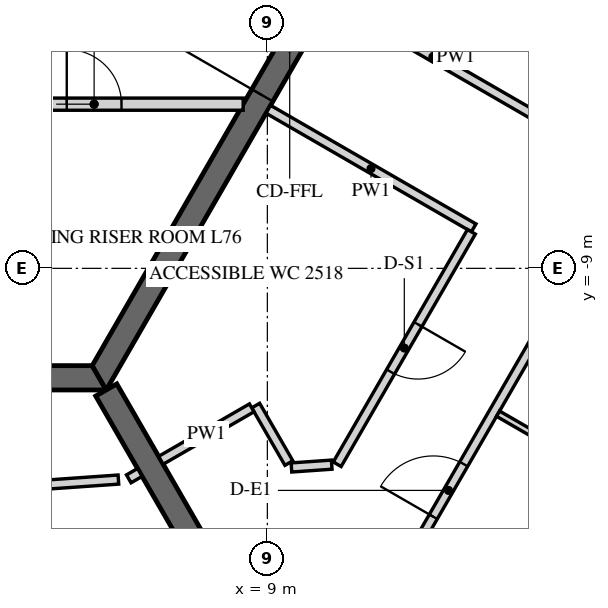
"""IFC4 building model, lengths in metres.
Left out: names, types, materials, properties, quantities, classifications, styles, units other than length and angle.
Written with IfcOpenShell. Run it as: python <this file> out.ifc"""

import sys

from ifc_helpers import new_model, si_unit, direction, frame, frame_2d, origin, place, context, subcontext, project, spatial, polyline, rectangle, outline, extrude, element, fill, save


model = new_model("IFC4")
c1 = context("Model", 3, precision=1e-05, world=origin(), true_north=direction((0.0, 1.0)))
c2 = subcontext(c1, "Body", "Model", "MODEL_VIEW")
j1 = project(units=[si_unit("LENGTHUNIT", "METRE"), si_unit("PLANEANGLEUNIT", "RADIAN")], contexts=[c1])
p1 = place(None, origin())
s1 = spatial("IfcSite", under=j1, at=p1, CompositionType="ELEMENT")
p2 = place(p1, origin())
s2 = spatial("IfcBuilding", under=s1, at=p2, CompositionType="ELEMENT")
p3 = place(p2, frame((0.0, 0.0, 314.7)))
s3 = spatial("IfcBuildingStorey", under=s2, at=p3, CompositionType="ELEMENT", Elevation=314.7)
p4 = place(p3, frame((-6.235, -10.8, -0.15), z_axis=(0.0, 0.0, 1.0), x_axis=(1.0, 0.0, 0.0)))
e1 = element("IfcWall", 1, at=p4, inside=s3, PredefinedType="SHEAR", context=c2, shape_type="SweptSolid", body=[
    extrude(outline(polyline([(-0.115, -0.2), (12.586, -0.2), (12.355, 0.2), (0.115, 0.2), (-0.115, -0.2)])), origin(), (0.0, 0.0, 1.0), 3.9),
])
p5 = place(p3, frame((6.235, -10.8, -0.15), z_axis=(0.0, 0.0, 1.0), x_axis=(0.499996419489, 0.866027470984, 0.0)))
e2 = element("IfcWall", 2, at=p5, inside=s3, PredefinedType="SHEAR", context=c2, shape_type="SweptSolid", body=[
    extrude(outline(polyline([(-0.115, -0.2), (12.586, -0.2), (12.355, 0.2), (0.115, 0.2), (-0.115, -0.2)])), origin(), (0.0, 0.0, 1.0), 3.9),
])
p6 = place(p5, frame((5.364, 0.0, 0.15)))
e3 = element("IfcOpeningElement", 3, at=p6, cuts=e2, PredefinedType="OPENING", context=c2, shape_type="SweptSolid", body=[
    extrude(rectangle(XDim=1.8, YDim=2.4, at=frame_2d((0.9, 1.2))), frame((0.0, 0.21, 0.0), z_axis=(0.0, -1.0, 0.0), x_axis=(1.0, 0.0, 0.0)), (0.0, 0.0, 1.0), 0.42),
])
p7 = place(p3, frame((6.351, -11.0, -0.15), z_axis=(0.0, 0.0, 1.0), x_axis=(0.499998894578, -0.866026041999, 0.0)))
e4 = element("IfcWall", 4, at=p7, inside=s3, PredefinedType="SHEAR", context=c2, shape_type="SweptSolid", body=[
    extrude(rectangle(XDim=15.544, YDim=0.4, at=frame_2d((7.772, 0.0))), origin(), (0.0, 0.0, 1.0), 3.9),
])
p8 = place(p7, frame((6.872, 0.0, 0.15)))
e5 = element("IfcOpeningElement", 5, at=p8, cuts=e4, PredefinedType="OPENING", context=c2, shape_type="SweptSolid", body=[
    extrude(rectangle(XDim=1.8, YDim=2.4, at=frame_2d((0.9, 1.2))), frame((0.0, 0.21, 0.0), z_axis=(0.0, -1.0, 0.0), x_axis=(1.0, 0.0, 0.0)), (0.0, 0.0, 1.0), 0.42),
])
p9 = place(p3, frame((3.7, -6.3, 0.0), z_axis=(0.0, 0.0, 1.0), x_axis=(1.0, 0.0, 0.0)))
e6 = element("IfcWall", 6, at=p9, inside=s3, PredefinedType="PARTITIONING", context=c2, shape_type="SweptSolid", body=[
    extrude(rectangle(XDim=4.903, YDim=0.2, at=frame_2d((2.451, 0.0))), origin(), (0.0, 0.0, 1.0), 3.65),
])
p10 = place(p9, frame((2.001, 0.0, 0.0)))
e7 = element("IfcOpeningElement", 7, at=p10, cuts=e6, PredefinedType="OPENING", context=c2, shape_type="SweptSolid", body=[
    extrude(rectangle(XDim=0.9, YDim=2.1, at=frame_2d((0.45, 1.05))), frame((0.0, 0.11, 0.0), z_axis=(0.0, -1.0, 0.0), x_axis=(1.0, 0.0, 0.0)), (0.0, 0.0, 1.0), 0.22),
])
p11 = place(p3, frame((6.903, -12.356, 0.0), z_axis=(0.0, 0.0, 1.0), x_axis=(-0.866088799389, -0.499890179513, 0.0)))
e8 = element("IfcWall", 8, at=p11, inside=s3, PredefinedType="PARTITIONING", context=c2, shape_type="SweptSolid", body=[
    extrude(rectangle(XDim=0.21, YDim=0.15, at=frame_2d((0.105, 0.0))), origin(), (0.0, 0.0, 1.0), 2.988),
])
p12 = place(p3, frame((6.551, -12.473, 0.0), z_axis=(0.0, 0.0, 1.0), x_axis=(-0.997563421853, -0.069765459797, 0.0)))
e9 = element("IfcWall", 9, at=p12, inside=s3, PredefinedType="PARTITIONING", context=c2, shape_type="SweptSolid", body=[
    extrude(rectangle(XDim=15.95, YDim=0.15, at=frame_2d((7.975, 0.0))), origin(), (0.0, 0.0, 1.0), 2.988),
])
p13 = place(p12, frame((7.525, 0.0, 0.0)))
e10 = element("IfcOpeningElement", 10, at=p13, cuts=e9, PredefinedType="OPENING", context=c2, shape_type="SweptSolid", body=[
    extrude(rectangle(XDim=0.9, YDim=2.1, at=frame_2d((0.45, 1.05))), frame((0.0, 0.085, 0.0), z_axis=(0.0, -1.0, 0.0), x_axis=(1.0, 0.0, 0.0)), (0.0, 0.0, 1.0), 0.17),
])
p14 = place(p3, frame((11.229, -13.951, 0.0), z_axis=(0.0, 0.0, 1.0), x_axis=(0.499997948852, 0.866026588012, 0.0)))
e11 = element("IfcWall", 11, at=p14, inside=s3, PredefinedType="PARTITIONING", context=c2, shape_type="SweptSolid", body=[
    extrude(rectangle(XDim=14.677, YDim=0.15, at=frame_2d((7.339, 0.0))), origin(), (0.0, 0.0, 1.0), 2.988),
])
p15 = place(p14, frame((1.0, 0.0, 0.0)))
e12 = element("IfcOpeningElement", 12, at=p15, cuts=e11, PredefinedType="OPENING", context=c2, shape_type="SweptSolid", body=[
    extrude(rectangle(XDim=1.0, YDim=2.1, at=frame_2d((0.5, 1.05))), frame((0.0, 0.085, 0.0), z_axis=(0.0, -1.0, 0.0), x_axis=(1.0, 0.0, 0.0)), (0.0, 0.0, 1.0), 0.17),
])
p16 = place(p14, frame((13.527, 0.0, 0.0)))
e13 = element("IfcOpeningElement", 13, at=p16, cuts=e11, PredefinedType="OPENING", context=c2, shape_type="SweptSolid", body=[
    extrude(rectangle(XDim=1.0, YDim=2.1, at=frame_2d((0.5, 1.05))), frame((0.0, 0.085, 0.0), z_axis=(0.0, -1.0, 0.0), x_axis=(1.0, 0.0, 0.0)), (0.0, 0.0, 1.0), 0.17),
])
p17 = place(p3, frame((13.378, -6.478, 0.0), z_axis=(0.0, 0.0, 1.0), x_axis=(-0.866011265228, 0.500024487898, 0.0)))
e14 = element("IfcWall", 14, at=p17, inside=s3, PredefinedType="PARTITIONING", context=c2, shape_type="SweptSolid", body=[
    extrude(rectangle(XDim=3.825, YDim=0.15, at=frame_2d((1.913, 0.0))), origin(), (0.0, 0.0, 1.0), 2.988),
])
p18 = place(p3, frame((9.016, -6.384, 0.0), z_axis=(0.0, 0.0, 1.0), x_axis=(0.866042777325, -0.499969906938, 0.0)))
e15 = element("IfcWall", 15, at=p18, inside=s3, PredefinedType="PARTITIONING", context=c2, shape_type="SweptSolid", body=[
    extrude(rectangle(XDim=3.9, YDim=0.15, at=frame_2d((1.95, 0.0))), origin(), (0.0, 0.0, 1.0), 2.988),
])
p19 = place(p3, frame((12.356, -8.399, 0.0), z_axis=(0.0, 0.0, 1.0), x_axis=(-0.499993756358, -0.866029008523, 0.0)))
e16 = element("IfcWall", 16, at=p19, inside=s3, PredefinedType="PARTITIONING", context=c2, shape_type="SweptSolid", body=[
    extrude(rectangle(XDim=4.414, YDim=0.15, at=frame_2d((2.207, 0.0))), origin(), (0.0, 0.0, 1.0), 2.988),
])
p20 = place(p19, frame((1.757, 0.0, 0.0)))
e17 = element("IfcOpeningElement", 17, at=p20, cuts=e16, PredefinedType="OPENING", context=c2, shape_type="SweptSolid", body=[
    extrude(rectangle(XDim=0.9, YDim=2.1, at=frame_2d((0.45, 1.05))), frame((0.0, 0.085, 0.0), z_axis=(0.0, -1.0, 0.0), x_axis=(1.0, 0.0, 0.0)), (0.0, 0.0, 1.0), 0.17),
])
p21 = place(p3, frame((10.059, -12.228, 0.0), z_axis=(0.0, 0.0, 1.0), x_axis=(-0.99755845504, -0.069836443057, 0.0)))
e18 = element("IfcWall", 18, at=p21, inside=s3, PredefinedType="PARTITIONING", context=c2, shape_type="SweptSolid", body=[
    extrude(rectangle(XDim=0.664, YDim=0.15, at=frame_2d((0.332, 0.0))), origin(), (0.0, 0.0, 1.0), 2.988),
])
p22 = place(p3, frame((9.354, -12.202, 0.0), z_axis=(0.0, 0.0, 1.0), x_axis=(-0.499986987217, 0.866032916588, 0.0)))
e19 = element("IfcWall", 19, at=p22, inside=s3, PredefinedType="PARTITIONING", context=c2, shape_type="SweptSolid", body=[
    extrude(rectangle(XDim=1.092, YDim=0.15, at=frame_2d((0.546, 0.0))), origin(), (0.0, 0.0, 1.0), 2.988),
])
p23 = place(p3, frame((8.743, -11.294, 0.0), z_axis=(0.0, 0.0, 1.0), x_axis=(-0.866013532718, -0.500020560727, 0.0)))
e20 = element("IfcWall", 20, at=p23, inside=s3, PredefinedType="PARTITIONING", context=c2, shape_type="SweptSolid", body=[
    extrude(rectangle(XDim=1.725, YDim=0.15, at=frame_2d((0.863, 0.0))), origin(), (0.0, 0.0, 1.0), 2.988),
])
p24 = place(p3, frame((16.02, -13.253, 0.0), z_axis=(0.0, 0.0, 1.0), x_axis=(-0.866028424924, 0.499994767197, 0.0)))
e21 = element("IfcWall", 21, at=p24, inside=s3, PredefinedType="PARTITIONING", context=c2, shape_type="SweptSolid", body=[
    extrude(rectangle(XDim=3.725, YDim=0.1, at=frame_2d((1.863, 0.0))), origin(), (0.0, 0.0, 1.0), 2.988),
])
p25 = place(p24, frame((1.5, 0.0, 0.0)))
e22 = element("IfcOpeningElement", 22, at=p25, cuts=e21, PredefinedType="OPENING", context=c2, shape_type="SweptSolid", body=[
    extrude(rectangle(XDim=0.8, YDim=2.1, at=frame_2d((0.4, 1.05))), frame((0.0, 0.06, 0.0), z_axis=(0.0, -1.0, 0.0), x_axis=(1.0, 0.0, 0.0)), (0.0, 0.0, 1.0), 0.12),
])
p26 = place(p6, origin())
e23 = element("IfcDoor", 23, at=p26, inside=s3, OperationType="DOUBLE_DOOR_SINGLE_SWING", PredefinedType="DOOR", context=c2, shape_type="SweptSolid", body=[
    extrude(rectangle(XDim=1.8, YDim=2.4, at=frame_2d((0.9, 1.2))), frame((0.0, 0.025, 0.0), z_axis=(0.0, -1.0, 0.0), x_axis=(1.0, 0.0, 0.0)), (0.0, 0.0, 1.0), 0.05),
])
fill(e3, e23)
p27 = place(p10, origin())
e24 = element("IfcDoor", 24, at=p27, inside=s3, OperationType="SINGLE_SWING_LEFT", PredefinedType="DOOR", context=c2, shape_type="SweptSolid", body=[
    extrude(rectangle(XDim=0.9, YDim=2.1, at=frame_2d((0.45, 1.05))), frame((0.0, 0.025, 0.0), z_axis=(0.0, -1.0, 0.0), x_axis=(1.0, 0.0, 0.0)), (0.0, 0.0, 1.0), 0.05),
])
fill(e7, e24)
p28 = place(p15, origin())
e25 = element("IfcDoor", 25, at=p28, inside=s3, OperationType="SINGLE_SWING_RIGHT", PredefinedType="DOOR", context=c2, shape_type="SweptSolid", body=[
    extrude(rectangle(XDim=1.0, YDim=2.1, at=frame_2d((0.5, 1.05))), frame((0.0, 0.025, 0.0), z_axis=(0.0, -1.0, 0.0), x_axis=(1.0, 0.0, 0.0)), (0.0, 0.0, 1.0), 0.05),
])
fill(e12, e25)
p29 = place(p20, origin())
e26 = element("IfcDoor", 26, at=p29, inside=s3, OperationType="SINGLE_SWING_LEFT", PredefinedType="DOOR", context=c2, shape_type="SweptSolid", body=[
    extrude(rectangle(XDim=0.9, YDim=2.1, at=frame_2d((0.45, 1.05))), frame((0.0, 0.025, 0.0), z_axis=(0.0, -1.0, 0.0), x_axis=(1.0, 0.0, 0.0)), (0.0, 0.0, 1.0), 0.05),
])
fill(e17, e26)
save(model, sys.argv[1])
